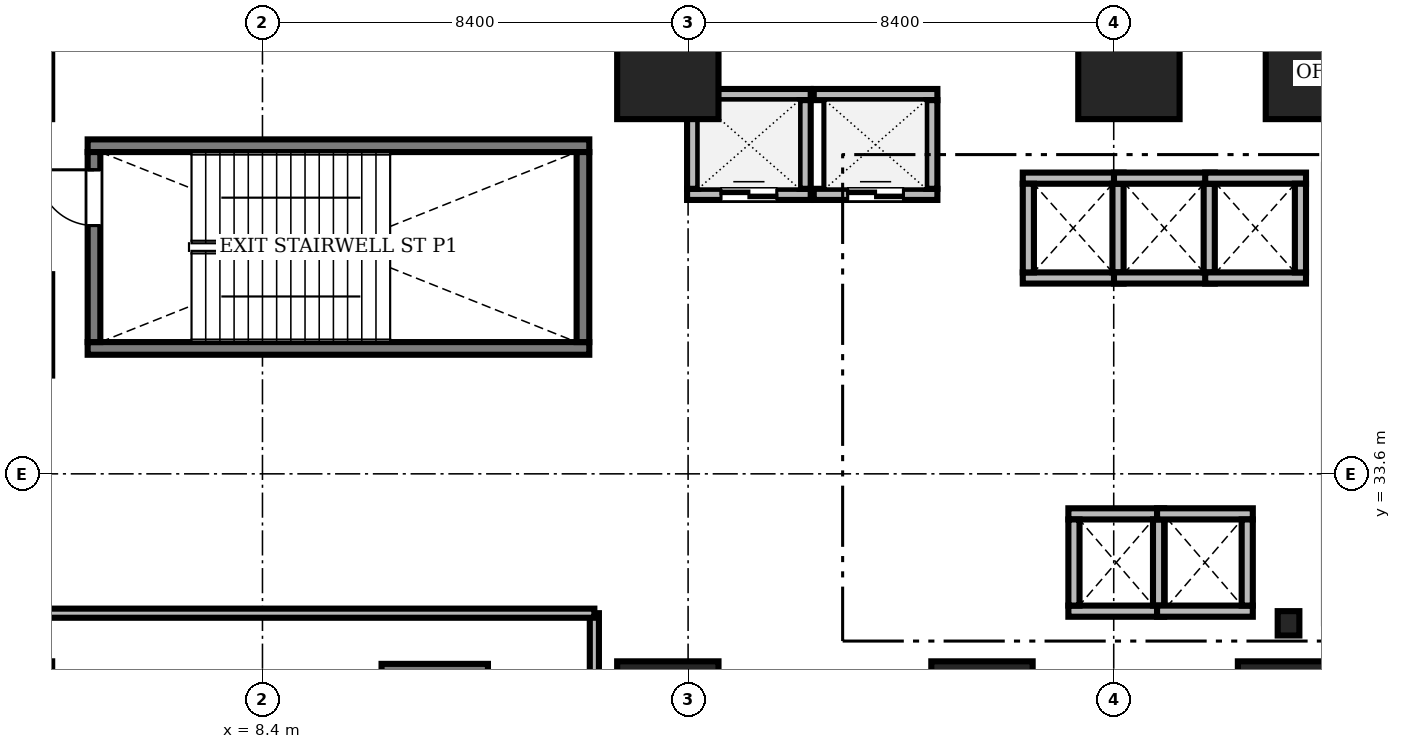
"""IFC4 building model, lengths in metres.
Left out: names, types, materials, properties, quantities, classifications, styles, units other than length and angle.
Written with IfcOpenShell. Run it as: python <this file> out.ifc"""

import sys

from ifc_helpers import new_model, si_unit, direction, frame, frame_2d, origin, origin_2d, place, context, subcontext, project, spatial, rectangle, i_section, extrude, source, transform, mapped, element, fill, save


model = new_model("IFC4")
c1 = context("Model", 3, precision=1e-05, world=origin(), true_north=direction((0.0, 1.0)))
c2 = subcontext(c1, "Body", "Model", "MODEL_VIEW")
j1 = project(units=[si_unit("LENGTHUNIT", "METRE"), si_unit("PLANEANGLEUNIT", "RADIAN")], contexts=[c1])
p1 = place(None, origin())
s1 = spatial("IfcSite", under=j1, at=p1, CompositionType="ELEMENT")
p2 = place(p1, origin())
s2 = spatial("IfcBuilding", under=s1, at=p2, CompositionType="ELEMENT")
p3 = place(p2, frame((0.0, 0.0, 6.0)))
s3 = spatial("IfcBuildingStorey", under=s2, at=p3, CompositionType="ELEMENT", Elevation=6.0)
m1 = source(origin(), c2, "Body", "SweptSolid", [
    extrude(i_section(OverallWidth=0.428, OverallDepth=0.481, WebThickness=0.04, FlangeThickness=0.063, FilletRadius=0.015, at=origin_2d()), origin(), (0.0, 0.0, 1.0), 5.0),
])
p4 = place(p3, frame((28.65, 30.65, 0.0), z_axis=(0.0, 0.0, 1.0), x_axis=(1.0, 0.0, 0.0)))
e1 = element("IfcColumn", 1, at=p4, inside=s3, PredefinedType="COLUMN", context=c2, shape_type="MappedRepresentation", body=[
    mapped(m1, transform((0.0, 0.0, 0.0), scale=1.0)),
])
m2 = source(origin(), c2, "Body", "SweptSolid", [
    extrude(rectangle(XDim=2.0, YDim=2.0, at=origin_2d()), origin(), (0.0, 0.0, 1.0), 5.0),
])
for number, where, z_axis, x_axis in (
    (2, (16.4, 28.9, 0.0), (0.0, 0.0, 1.0), (1.0, 0.0, 0.0)),
    (3, (22.6, 28.9, 0.0), (0.0, 0.0, 1.0), (1.0, 0.0, 0.0)),
    (4, (28.65, 28.9, 0.0), (0.0, 0.0, 1.0), (1.0, 0.0, 0.0)),
    (5, (16.4, 41.6, 0.0), (0.0, 0.0, 1.0), (1.0, 0.0, 0.0)),
    (6, (25.5, 41.6, 0.0), (0.0, 0.0, 1.0), (1.0, 0.0, 0.0)),
    (7, (29.2, 41.6, 0.0), (0.0, 0.0, 1.0), (1.0, 0.0, 0.0)),
):
    element("IfcColumn", number, at=place(p3, frame(where, z_axis=z_axis, x_axis=x_axis)), inside=s3, PredefinedType="COLUMN", context=c2, shape_type="MappedRepresentation", body=[
        mapped(m2, transform((0.0, 0.0, 0.0), scale=1.0)),
    ])
m3 = source(origin(), c2, "Body", "SweptSolid", [
    extrude(rectangle(XDim=9.9, YDim=0.25, at=frame_2d((4.95, 0.0))), origin(), (0.0, 0.0, 1.0), 5.2),
])
for number, where, z_axis, x_axis in (
    (8, (4.95, 36.075, 0.0), (0.0, 0.0, 1.0), (1.0, 0.0, 0.0)),
    (9, (4.95, 40.075, 0.0), (0.0, 0.0, 1.0), (1.0, 0.0, 0.0)),
):
    element("IfcWall", number, at=place(p3, frame(where, z_axis=z_axis, x_axis=x_axis)), inside=s3, PredefinedType="SOLIDWALL", context=c2, shape_type="MappedRepresentation", body=[
        mapped(m3, transform((0.0, 0.0, 0.0), scale=1.0)),
    ])
m4 = source(origin(), c2, "Body", "SweptSolid", [
    extrude(rectangle(XDim=3.75, YDim=0.25, at=frame_2d((1.875, 0.0))), origin(), (0.0, 0.0, 1.0), 5.2),
])
p5 = place(p3, frame((14.725, 36.2, 0.0), z_axis=(0.0, 0.0, 1.0), x_axis=(0.0, 1.0, 0.0)))
e10 = element("IfcWall", 10, at=p5, inside=s3, PredefinedType="SOLIDWALL", context=c2, shape_type="MappedRepresentation", body=[
    mapped(m4, transform((0.0, 0.0, 0.0), scale=1.0)),
])
p6 = place(p3, frame((5.075, 36.2, 0.0), z_axis=(0.0, 0.0, 1.0), x_axis=(0.0, 1.0, 0.0)))
e11 = element("IfcWall", 11, at=p6, inside=s3, PredefinedType="SOLIDWALL", context=c2, shape_type="MappedRepresentation", body=[
    mapped(m4, transform((0.0, 0.0, 0.0), scale=1.0)),
])
m5 = source(origin(), c2, "Body", "SweptSolid", [
    extrude(rectangle(XDim=1.1, YDim=2.2, at=frame_2d((0.55, 1.1))), frame((0.0, 0.135, 0.0), z_axis=(0.0, -1.0, 0.0), x_axis=(1.0, 0.0, 0.0)), (0.0, 0.0, 1.0), 0.27),
])
p7 = place(p6, frame((2.3, 0.0, 0.0)))
e12 = element("IfcOpeningElement", 12, at=p7, cuts=e11, PredefinedType="OPENING", context=c2, shape_type="MappedRepresentation", body=[
    mapped(m5, transform((0.0, 0.0, 0.0), scale=1.0)),
])
m6 = source(origin(), c2, "Body", "SweptSolid", [
    extrude(rectangle(XDim=2.1, YDim=0.25, at=frame_2d((1.05, 0.0))), origin(), (0.0, 0.0, 1.0), 5.0),
])
p8 = place(p3, frame((10.75, 29.725, 0.0), z_axis=(0.0, 0.0, 1.0), x_axis=(1.0, 0.0, 0.0)))
e13 = element("IfcWall", 13, at=p8, inside=s3, PredefinedType="SOLIDWALL", context=c2, shape_type="MappedRepresentation", body=[
    mapped(m6, transform((0.0, 0.0, 0.0), scale=1.0)),
])
m7 = source(origin(), c2, "Body", "SweptSolid", [
    extrude(rectangle(XDim=2.44, YDim=0.22, at=frame_2d((1.22, 0.0))), origin(), (0.0, 0.0, 1.0), 5.0),
])
p9 = place(p3, frame((16.78, 39.115, 0.0), z_axis=(0.0, 0.0, 1.0), x_axis=(1.0, 0.0, 0.0)))
e14 = element("IfcWall", 14, at=p9, inside=s3, PredefinedType="SOLIDWALL", context=c2, shape_type="MappedRepresentation", body=[
    mapped(m7, transform((0.0, 0.0, 0.0), scale=1.0)),
])
m8 = source(origin(), c2, "Body", "SweptSolid", [
    extrude(rectangle(XDim=1.1, YDim=2.2, at=frame_2d((0.55, 1.1))), frame((0.0, 0.12, 0.0), z_axis=(0.0, -1.0, 0.0), x_axis=(1.0, 0.0, 0.0)), (0.0, 0.0, 1.0), 0.24),
])
p10 = place(p9, frame((0.67, 0.0, 0.0)))
e15 = element("IfcOpeningElement", 15, at=p10, cuts=e14, PredefinedType="OPENING", context=c2, shape_type="MappedRepresentation", body=[
    mapped(m8, transform((0.0, 0.0, 0.0), scale=1.0)),
])
p11 = place(p3, frame((16.78, 41.085, 0.0), z_axis=(0.0, 0.0, 1.0), x_axis=(1.0, 0.0, 0.0)))
e16 = element("IfcWall", 16, at=p11, inside=s3, PredefinedType="SOLIDWALL", context=c2, shape_type="MappedRepresentation", body=[
    mapped(m7, transform((0.0, 0.0, 0.0), scale=1.0)),
])
m9 = source(origin(), c2, "Body", "SweptSolid", [
    extrude(rectangle(XDim=1.75, YDim=0.22, at=frame_2d((0.875, 0.0))), origin(), (0.0, 0.0, 1.0), 5.0),
])
for number, where, z_axis, x_axis in (
    (17, (16.89, 39.225, 0.0), (0.0, 0.0, 1.0), (0.0, 1.0, 0.0)),
    (18, (19.11, 39.225, 0.0), (0.0, 0.0, 1.0), (0.0, 1.0, 0.0)),
):
    element("IfcWall", number, at=place(p3, frame(where, z_axis=z_axis, x_axis=x_axis)), inside=s3, PredefinedType="SOLIDWALL", context=c2, shape_type="MappedRepresentation", body=[
        mapped(m9, transform((0.0, 0.0, 0.0), scale=1.0)),
    ])
p12 = place(p3, frame((19.28, 39.115, 0.0), z_axis=(0.0, 0.0, 1.0), x_axis=(1.0, 0.0, 0.0)))
e19 = element("IfcWall", 19, at=p12, inside=s3, PredefinedType="SOLIDWALL", context=c2, shape_type="MappedRepresentation", body=[
    mapped(m7, transform((0.0, 0.0, 0.0), scale=1.0)),
])
p13 = place(p12, frame((0.67, 0.0, 0.0)))
e20 = element("IfcOpeningElement", 20, at=p13, cuts=e19, PredefinedType="OPENING", context=c2, shape_type="MappedRepresentation", body=[
    mapped(m8, transform((0.0, 0.0, 0.0), scale=1.0)),
])
p14 = place(p3, frame((19.28, 41.085, 0.0), z_axis=(0.0, 0.0, 1.0), x_axis=(1.0, 0.0, 0.0)))
e21 = element("IfcWall", 21, at=p14, inside=s3, PredefinedType="SOLIDWALL", context=c2, shape_type="MappedRepresentation", body=[
    mapped(m7, transform((0.0, 0.0, 0.0), scale=1.0)),
])
p15 = place(p3, frame((21.61, 39.225, 0.0), z_axis=(0.0, 0.0, 1.0), x_axis=(0.0, 1.0, 0.0)))
e22 = element("IfcWall", 22, at=p15, inside=s3, PredefinedType="SOLIDWALL", context=c2, shape_type="MappedRepresentation", body=[
    mapped(m9, transform((0.0, 0.0, 0.0), scale=1.0)),
])
m10 = source(origin(), c2, "Body", "SweptSolid", [
    extrude(rectangle(XDim=1.99, YDim=0.22, at=frame_2d((0.995, 0.0))), origin(), (0.0, 0.0, 1.0), 5.0),
])
for number, where, z_axis, x_axis in (
    (23, (23.405, 37.465, 0.0), (0.0, 0.0, 1.0), (1.0, 0.0, 0.0)),
    (24, (23.405, 39.435, 0.0), (0.0, 0.0, 1.0), (1.0, 0.0, 0.0)),
):
    element("IfcWall", number, at=place(p3, frame(where, z_axis=z_axis, x_axis=x_axis)), inside=s3, PredefinedType="SOLIDWALL", context=c2, shape_type="MappedRepresentation", body=[
        mapped(m10, transform((0.0, 0.0, 0.0), scale=1.0)),
    ])
for number, where, z_axis, x_axis in (
    (25, (23.515, 37.575, 0.0), (0.0, 0.0, 1.0), (0.0, 1.0, 0.0)),
    (26, (25.285, 37.575, 0.0), (0.0, 0.0, 1.0), (0.0, 1.0, 0.0)),
):
    element("IfcWall", number, at=place(p3, frame(where, z_axis=z_axis, x_axis=x_axis)), inside=s3, PredefinedType="SOLIDWALL", context=c2, shape_type="MappedRepresentation", body=[
        mapped(m9, transform((0.0, 0.0, 0.0), scale=1.0)),
    ])
for number, where, z_axis, x_axis in (
    (27, (25.205, 37.465, 0.0), (0.0, 0.0, 1.0), (1.0, 0.0, 0.0)),
    (28, (25.205, 39.435, 0.0), (0.0, 0.0, 1.0), (1.0, 0.0, 0.0)),
):
    element("IfcWall", number, at=place(p3, frame(where, z_axis=z_axis, x_axis=x_axis)), inside=s3, PredefinedType="SOLIDWALL", context=c2, shape_type="MappedRepresentation", body=[
        mapped(m10, transform((0.0, 0.0, 0.0), scale=1.0)),
    ])
p16 = place(p3, frame((27.085, 37.575, 0.0), z_axis=(0.0, 0.0, 1.0), x_axis=(0.0, 1.0, 0.0)))
e29 = element("IfcWall", 29, at=p16, inside=s3, PredefinedType="SOLIDWALL", context=c2, shape_type="MappedRepresentation", body=[
    mapped(m9, transform((0.0, 0.0, 0.0), scale=1.0)),
])
m11 = source(origin(), c2, "Body", "SweptSolid", [
    extrude(rectangle(XDim=1.99, YDim=0.22, at=frame_2d((0.995, 0.0))), origin(), (0.0, 0.0, 1.0), 5.0),
])
for number, where, z_axis, x_axis in (
    (30, (27.005, 37.465, 0.0), (0.0, 0.0, 1.0), (1.0, 0.0, 0.0)),
    (31, (27.005, 39.435, 0.0), (0.0, 0.0, 1.0), (1.0, 0.0, 0.0)),
):
    element("IfcWall", number, at=place(p3, frame(where, z_axis=z_axis, x_axis=x_axis)), inside=s3, PredefinedType="SOLIDWALL", context=c2, shape_type="MappedRepresentation", body=[
        mapped(m11, transform((0.0, 0.0, 0.0), scale=1.0)),
    ])
p17 = place(p3, frame((28.885, 37.575, 0.0), z_axis=(0.0, 0.0, 1.0), x_axis=(0.0, 1.0, 0.0)))
e32 = element("IfcWall", 32, at=p17, inside=s3, PredefinedType="SOLIDWALL", context=c2, shape_type="MappedRepresentation", body=[
    mapped(m9, transform((0.0, 0.0, 0.0), scale=1.0)),
])
m12 = source(origin(), c2, "Body", "SweptSolid", [
    extrude(rectangle(XDim=1.89, YDim=0.22, at=frame_2d((0.945, 0.0))), origin(), (0.0, 0.0, 1.0), 5.0),
])
for number, where, z_axis, x_axis in (
    (33, (24.305, 30.89, 0.0), (0.0, 0.0, 1.0), (1.0, 0.0, 0.0)),
    (34, (24.305, 32.81, 0.0), (0.0, 0.0, 1.0), (1.0, 0.0, 0.0)),
):
    element("IfcWall", number, at=place(p3, frame(where, z_axis=z_axis, x_axis=x_axis)), inside=s3, PredefinedType="SOLIDWALL", context=c2, shape_type="MappedRepresentation", body=[
        mapped(m12, transform((0.0, 0.0, 0.0), scale=1.0)),
    ])
m13 = source(origin(), c2, "Body", "SweptSolid", [
    extrude(rectangle(XDim=1.7, YDim=0.22, at=frame_2d((0.85, 0.0))), origin(), (0.0, 0.0, 1.0), 5.0),
])
for number, where, z_axis, x_axis in (
    (35, (24.415, 31.0, 0.0), (0.0, 0.0, 1.0), (0.0, 1.0, 0.0)),
    (36, (26.085, 31.0, 0.0), (0.0, 0.0, 1.0), (0.0, 1.0, 0.0)),
):
    element("IfcWall", number, at=place(p3, frame(where, z_axis=z_axis, x_axis=x_axis)), inside=s3, PredefinedType="SOLIDWALL", context=c2, shape_type="MappedRepresentation", body=[
        mapped(m13, transform((0.0, 0.0, 0.0), scale=1.0)),
    ])
for number, where, z_axis, x_axis in (
    (37, (26.055, 30.89, 0.0), (0.0, 0.0, 1.0), (1.0, 0.0, 0.0)),
    (38, (26.055, 32.81, 0.0), (0.0, 0.0, 1.0), (1.0, 0.0, 0.0)),
):
    element("IfcWall", number, at=place(p3, frame(where, z_axis=z_axis, x_axis=x_axis)), inside=s3, PredefinedType="SOLIDWALL", context=c2, shape_type="MappedRepresentation", body=[
        mapped(m12, transform((0.0, 0.0, 0.0), scale=1.0)),
    ])
p18 = place(p3, frame((27.835, 31.0, 0.0), z_axis=(0.0, 0.0, 1.0), x_axis=(0.0, 1.0, 0.0)))
e39 = element("IfcWall", 39, at=p18, inside=s3, PredefinedType="SOLIDWALL", context=c2, shape_type="MappedRepresentation", body=[
    mapped(m13, transform((0.0, 0.0, 0.0), scale=1.0)),
])
m14 = source(origin(), c2, "Body", "SweptSolid", [
    extrude(rectangle(XDim=8.5, YDim=0.18, at=frame_2d((4.25, 0.0))), origin(), (0.0, 0.0, 1.0), 5.0),
])
p19 = place(p3, frame((14.95, 22.35, 0.0), z_axis=(0.0, 0.0, 1.0), x_axis=(0.0, 1.0, 0.0)))
e40 = element("IfcWall", 40, at=p19, inside=s3, PredefinedType="PARTITIONING", context=c2, shape_type="MappedRepresentation", body=[
    mapped(m14, transform((0.0, 0.0, 0.0), scale=1.0)),
])
m15 = source(origin(), c2, "Body", "SweptSolid", [
    extrude(rectangle(XDim=1.05, YDim=2.2, at=frame_2d((0.525, 1.1))), frame((0.0, 0.1, 0.0), z_axis=(0.0, -1.0, 0.0), x_axis=(1.0, 0.0, 0.0)), (0.0, 0.0, 1.0), 0.2),
])
p20 = place(p19, frame((4.0, 0.0, 0.0)))
e41 = element("IfcOpeningElement", 41, at=p20, cuts=e40, PredefinedType="OPENING", context=c2, shape_type="MappedRepresentation", body=[
    mapped(m15, transform((0.0, 0.0, 0.0), scale=1.0)),
])
m16 = source(origin(), c2, "Body", "SweptSolid", [
    extrude(rectangle(XDim=11.2, YDim=0.18, at=frame_2d((5.6, 0.0))), origin(), (0.0, 0.0, 1.0), 5.0),
])
p21 = place(p3, frame((3.75, 30.85, 0.0), z_axis=(0.0, 0.0, 1.0), x_axis=(1.0, 0.0, 0.0)))
e42 = element("IfcWall", 42, at=p21, inside=s3, PredefinedType="PARTITIONING", context=c2, shape_type="MappedRepresentation", body=[
    mapped(m16, transform((0.0, 0.0, 0.0), scale=1.0)),
])
m17 = source(origin(), c2, "Body", "SweptSolid", [
    extrude(rectangle(XDim=1.1, YDim=2.2, at=frame_2d((0.55, 1.1))), frame((0.0, 0.025, 0.0), z_axis=(0.0, -1.0, 0.0), x_axis=(1.0, 0.0, 0.0)), (0.0, 0.0, 1.0), 0.05),
])
p22 = place(p7, origin())
e43 = element("IfcDoor", 43, at=p22, inside=s3, OperationType="SINGLE_SWING_RIGHT", PredefinedType="DOOR", context=c2, shape_type="MappedRepresentation", body=[
    mapped(m17, transform((0.0, 0.0, 0.0), scale=1.0)),
])
fill(e12, e43)
p23 = place(p10, origin())
e44 = element("IfcDoor", 44, at=p23, inside=s3, OperationType="DOUBLE_DOOR_SLIDING", PredefinedType="DOOR", context=c2, shape_type="MappedRepresentation", body=[
    mapped(m17, transform((0.0, 0.0, 0.0), scale=1.0)),
])
fill(e15, e44)
p24 = place(p13, origin())
e45 = element("IfcDoor", 45, at=p24, inside=s3, OperationType="DOUBLE_DOOR_SLIDING", PredefinedType="DOOR", context=c2, shape_type="MappedRepresentation", body=[
    mapped(m17, transform((0.0, 0.0, 0.0), scale=1.0)),
])
fill(e20, e45)
save(model, sys.argv[1])
